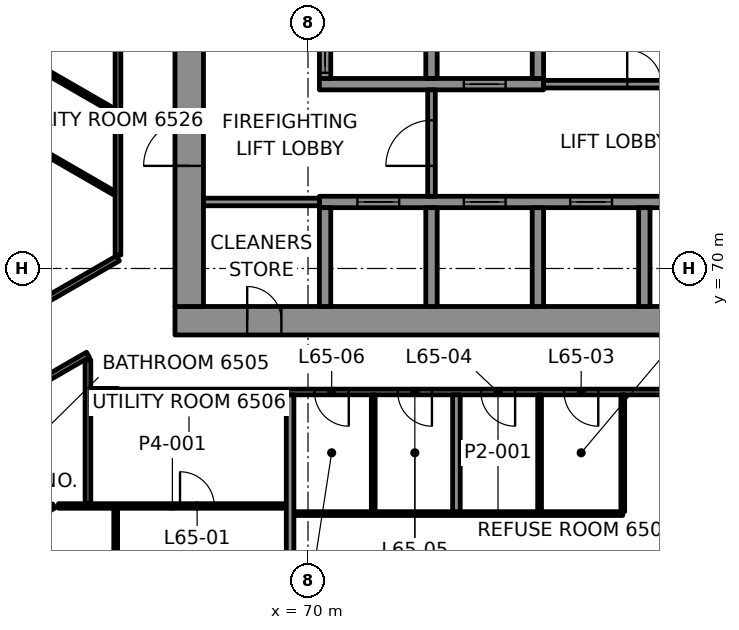
"""IFC4 building model, lengths in metres.
Left out: names, types, materials, properties, quantities, classifications, styles, units other than length and angle.
Written with IfcOpenShell. Run it as: python <this file> out.ifc"""

import sys

from ifc_helpers import new_model, si_unit, direction, frame, frame_2d, origin, place, context, subcontext, project, spatial, rectangle, extrude, element, fill, save


model = new_model("IFC4")
c1 = context("Model", 3, precision=1e-05, world=origin(), true_north=direction((0.0, 1.0)))
c2 = subcontext(c1, "Body", "Model", "MODEL_VIEW")
j1 = project(units=[si_unit("LENGTHUNIT", "METRE"), si_unit("PLANEANGLEUNIT", "RADIAN")], contexts=[c1])
p1 = place(None, origin())
s1 = spatial("IfcSite", under=j1, at=p1, CompositionType="ELEMENT")
p2 = place(p1, origin())
s2 = spatial("IfcBuilding", under=s1, at=p2, CompositionType="ELEMENT")
p3 = place(p2, frame((0.0, 0.0, 274.1)))
s3 = spatial("IfcBuildingStorey", under=s2, at=p3, CompositionType="ELEMENT", Elevation=274.1)
p4 = place(p3, frame((66.5, 68.625, 0.0), z_axis=(0.0, 0.0, 1.0), x_axis=(1.0, 0.0, 0.0)))
e1 = element("IfcWall", 1, at=p4, inside=s3, PredefinedType="SHEAR", context=c2, shape_type="SweptSolid", body=[
    extrude(rectangle(XDim=17.0, YDim=0.75, at=frame_2d((8.5, 0.0))), origin(), (0.0, 0.0, 1.0), 3.3),
])
p5 = place(p4, frame((1.9, 0.0, 0.0)))
e2 = element("IfcOpeningElement", 2, at=p5, cuts=e1, PredefinedType="OPENING", context=c2, shape_type="SweptSolid", body=[
    extrude(rectangle(XDim=0.9, YDim=2.1, at=frame_2d((0.45, 1.05))), frame((0.0, 0.385, 0.0), z_axis=(0.0, -1.0, 0.0), x_axis=(1.0, 0.0, 0.0)), (0.0, 0.0, 1.0), 0.77),
])
p6 = place(p3, frame((66.875, 69.0, 0.0), z_axis=(0.0, 0.0, 1.0), x_axis=(0.0, 1.0, 0.0)))
e3 = element("IfcWall", 3, at=p6, inside=s3, PredefinedType="SHEAR", context=c2, shape_type="SweptSolid", body=[
    extrude(rectangle(XDim=12.0, YDim=0.75, at=frame_2d((6.0, 0.0))), origin(), (0.0, 0.0, 1.0), 3.3),
])
p7 = place(p6, frame((3.7, 0.0, 0.0)))
e4 = element("IfcOpeningElement", 4, at=p7, cuts=e3, PredefinedType="OPENING", context=c2, shape_type="SweptSolid", body=[
    extrude(rectangle(XDim=1.2, YDim=2.1, at=frame_2d((0.6, 1.05))), frame((0.0, 0.385, 0.0), z_axis=(0.0, -1.0, 0.0), x_axis=(1.0, 0.0, 0.0)), (0.0, 0.0, 1.0), 0.77),
])
p8 = place(p3, frame((70.3, 71.75, 0.0), z_axis=(0.0, 0.0, 1.0), x_axis=(1.0, 0.0, 0.0)))
e5 = element("IfcWall", 5, at=p8, inside=s3, PredefinedType="SHEAR", context=c2, shape_type="SweptSolid", body=[
    extrude(rectangle(XDim=11.5, YDim=0.3, at=frame_2d((5.75, 0.0))), origin(), (0.0, 0.0, 1.0), 3.3),
])
p9 = place(p8, frame((1.0, 0.0, 0.0)))
e6 = element("IfcOpeningElement", 6, at=p9, cuts=e5, PredefinedType="OPENING", context=c2, shape_type="SweptSolid", body=[
    extrude(rectangle(XDim=1.1, YDim=2.1, at=frame_2d((0.55, 1.05))), frame((0.0, 0.16, 0.0), z_axis=(0.0, -1.0, 0.0), x_axis=(1.0, 0.0, 0.0)), (0.0, 0.0, 1.0), 0.32),
])
p10 = place(p8, frame((3.8, 0.0, 0.0)))
e7 = element("IfcOpeningElement", 7, at=p10, cuts=e5, PredefinedType="OPENING", context=c2, shape_type="SweptSolid", body=[
    extrude(rectangle(XDim=1.1, YDim=2.1, at=frame_2d((0.55, 1.05))), frame((0.0, 0.16, 0.0), z_axis=(0.0, -1.0, 0.0), x_axis=(1.0, 0.0, 0.0)), (0.0, 0.0, 1.0), 0.32),
])
p11 = place(p8, frame((6.6, 0.0, 0.0)))
e8 = element("IfcOpeningElement", 8, at=p11, cuts=e5, PredefinedType="OPENING", context=c2, shape_type="SweptSolid", body=[
    extrude(rectangle(XDim=1.1, YDim=2.1, at=frame_2d((0.55, 1.05))), frame((0.0, 0.16, 0.0), z_axis=(0.0, -1.0, 0.0), x_axis=(1.0, 0.0, 0.0)), (0.0, 0.0, 1.0), 0.32),
])
p12 = place(p8, frame((9.4, 0.0, 0.0)))
e9 = element("IfcOpeningElement", 9, at=p12, cuts=e5, PredefinedType="OPENING", context=c2, shape_type="SweptSolid", body=[
    extrude(rectangle(XDim=1.1, YDim=2.1, at=frame_2d((0.55, 1.05))), frame((0.0, 0.16, 0.0), z_axis=(0.0, -1.0, 0.0), x_axis=(1.0, 0.0, 0.0)), (0.0, 0.0, 1.0), 0.32),
])
p13 = place(p3, frame((70.3, 74.85, 0.0), z_axis=(0.0, 0.0, 1.0), x_axis=(1.0, 0.0, 0.0)))
e10 = element("IfcWall", 10, at=p13, inside=s3, PredefinedType="SHEAR", context=c2, shape_type="SweptSolid", body=[
    extrude(rectangle(XDim=5.9, YDim=0.3, at=frame_2d((2.95, 0.0))), origin(), (0.0, 0.0, 1.0), 3.3),
])
p14 = place(p13, frame((3.8, 0.0, 0.0)))
e11 = element("IfcOpeningElement", 11, at=p14, cuts=e10, PredefinedType="OPENING", context=c2, shape_type="SweptSolid", body=[
    extrude(rectangle(XDim=1.1, YDim=2.1, at=frame_2d((0.55, 1.05))), frame((0.0, 0.16, 0.0), z_axis=(0.0, -1.0, 0.0), x_axis=(1.0, 0.0, 0.0)), (0.0, 0.0, 1.0), 0.32),
])
p15 = place(p3, frame((70.45, 69.0, 0.0), z_axis=(0.0, 0.0, 1.0), x_axis=(0.0, 1.0, 0.0)))
e12 = element("IfcWall", 12, at=p15, inside=s3, PredefinedType="SHEAR", context=c2, shape_type="SweptSolid", body=[
    extrude(rectangle(XDim=2.6, YDim=0.3, at=frame_2d((1.3, 0.0))), origin(), (0.0, 0.0, 1.0), 3.3),
])
p16 = place(p3, frame((70.45, 75.0, 0.0), z_axis=(0.0, 0.0, 1.0), x_axis=(0.0, 1.0, 0.0)))
e13 = element("IfcWall", 13, at=p16, inside=s3, PredefinedType="SHEAR", context=c2, shape_type="SweptSolid", body=[
    extrude(rectangle(XDim=2.6, YDim=0.3, at=frame_2d((1.3, 0.0))), origin(), (0.0, 0.0, 1.0), 3.3),
])
p17 = place(p16, frame((0.15, 0.0, 0.0)))
e14 = element("IfcOpeningElement", 14, at=p17, cuts=e13, PredefinedType="OPENING", context=c2, shape_type="SweptSolid", body=[
    extrude(rectangle(XDim=1.1, YDim=2.1, at=frame_2d((0.55, 1.05))), frame((0.0, 0.16, 0.0), z_axis=(0.0, -1.0, 0.0), x_axis=(1.0, 0.0, 0.0)), (0.0, 0.0, 1.0), 0.32),
])
for number, where, z_axis, x_axis in (
    (15, (73.25, 69.0, 0.0), (0.0, 0.0, 1.0), (0.0, 1.0, 0.0)),
    (16, (73.25, 75.0, 0.0), (0.0, 0.0, 1.0), (0.0, 1.0, 0.0)),
    (17, (76.05, 69.0, 0.0), (0.0, 0.0, 1.0), (0.0, 1.0, 0.0)),
    (18, (76.05, 75.0, 0.0), (0.0, 0.0, 1.0), (0.0, 1.0, 0.0)),
    (19, (78.85, 69.0, 0.0), (0.0, 0.0, 1.0), (0.0, 1.0, 0.0)),
):
    element("IfcWall", number, at=place(p3, frame(where, z_axis=z_axis, x_axis=x_axis)), inside=s3, PredefinedType="SHEAR", context=c2, shape_type="SweptSolid", body=[
        extrude(rectangle(XDim=2.6, YDim=0.3, at=frame_2d((1.3, 0.0))), origin(), (0.0, 0.0, 1.0), 3.3),
    ])
p18 = place(p3, frame((69.629, 63.55, 0.0), z_axis=(0.0, 0.0, 1.0), x_axis=(1.0, 0.0, 0.0)))
e20 = element("IfcWall", 20, at=p18, inside=s3, PredefinedType="PARTITIONING", context=c2, shape_type="SweptSolid", body=[
    extrude(rectangle(XDim=8.653, YDim=0.1, at=frame_2d((4.326, 0.0))), origin(), (0.0, 0.0, 1.0), 2.7),
])
p19 = place(p3, frame((63.434, 63.75, 0.0), z_axis=(0.0, 0.0, 1.0), x_axis=(1.0, 0.0, 0.0)))
e21 = element("IfcWall", 21, at=p19, inside=s3, PredefinedType="PARTITIONING", context=c2, shape_type="SweptSolid", body=[
    extrude(rectangle(XDim=5.995, YDim=0.12, at=frame_2d((2.997, 0.0))), origin(), (0.0, 0.0, 1.0), 2.7),
])
p20 = place(p19, frame((3.199, 0.0, 0.0)))
e22 = element("IfcOpeningElement", 22, at=p20, cuts=e21, PredefinedType="OPENING", context=c2, shape_type="SweptSolid", body=[
    extrude(rectangle(XDim=0.9, YDim=2.1, at=frame_2d((0.45, 1.05))), frame((0.0, 0.07, 0.0), z_axis=(0.0, -1.0, 0.0), x_axis=(1.0, 0.0, 0.0)), (0.0, 0.0, 1.0), 0.14),
])
p21 = place(p3, frame((85.0, 66.75, 0.0), z_axis=(0.0, 0.0, 1.0), x_axis=(-1.0, 0.0, 0.0)))
e23 = element("IfcWall", 23, at=p21, inside=s3, PredefinedType="PARTITIONING", context=c2, shape_type="SweptSolid", body=[
    extrude(rectangle(XDim=19.999, YDim=0.15, at=frame_2d((10.0, 0.0))), origin(), (0.0, 0.0, 1.0), 2.7),
])
p22 = place(p21, frame((2.96, 0.0, 0.0)))
e24 = element("IfcOpeningElement", 24, at=p22, cuts=e23, PredefinedType="OPENING", context=c2, shape_type="SweptSolid", body=[
    extrude(rectangle(XDim=1.0, YDim=2.1, at=frame_2d((0.5, 1.05))), frame((0.0, 0.085, 0.0), z_axis=(0.0, -1.0, 0.0), x_axis=(1.0, 0.0, 0.0)), (0.0, 0.0, 1.0), 0.17),
])
p23 = place(p21, frame((7.361, 0.0, 0.0)))
e25 = element("IfcOpeningElement", 25, at=p23, cuts=e23, PredefinedType="OPENING", context=c2, shape_type="SweptSolid", body=[
    extrude(rectangle(XDim=0.9, YDim=2.1, at=frame_2d((0.45, 1.05))), frame((0.0, 0.085, 0.0), z_axis=(0.0, -1.0, 0.0), x_axis=(1.0, 0.0, 0.0)), (0.0, 0.0, 1.0), 0.17),
])
p24 = place(p21, frame((9.55, 0.0, 0.0)))
e26 = element("IfcOpeningElement", 26, at=p24, cuts=e23, PredefinedType="OPENING", context=c2, shape_type="SweptSolid", body=[
    extrude(rectangle(XDim=0.9, YDim=2.1, at=frame_2d((0.45, 1.05))), frame((0.0, 0.085, 0.0), z_axis=(0.0, -1.0, 0.0), x_axis=(1.0, 0.0, 0.0)), (0.0, 0.0, 1.0), 0.17),
])
p25 = place(p21, frame((11.738, 0.0, 0.0)))
e27 = element("IfcOpeningElement", 27, at=p25, cuts=e23, PredefinedType="OPENING", context=c2, shape_type="SweptSolid", body=[
    extrude(rectangle(XDim=0.9, YDim=2.1, at=frame_2d((0.45, 1.05))), frame((0.0, 0.085, 0.0), z_axis=(0.0, -1.0, 0.0), x_axis=(1.0, 0.0, 0.0)), (0.0, 0.0, 1.0), 0.17),
])
p26 = place(p21, frame((13.926, 0.0, 0.0)))
e28 = element("IfcOpeningElement", 28, at=p26, cuts=e23, PredefinedType="OPENING", context=c2, shape_type="SweptSolid", body=[
    extrude(rectangle(XDim=0.9, YDim=2.1, at=frame_2d((0.45, 1.05))), frame((0.0, 0.085, 0.0), z_axis=(0.0, -1.0, 0.0), x_axis=(1.0, 0.0, 0.0)), (0.0, 0.0, 1.0), 0.17),
])
p27 = place(p3, frame((64.295, 66.769, 0.0), z_axis=(0.0, 0.0, 1.0), x_axis=(1.0, 0.0, 0.0)))
e29 = element("IfcWall", 29, at=p27, inside=s3, PredefinedType="PARTITIONING", context=c2, shape_type="SweptSolid", body=[
    extrude(rectangle(XDim=0.705, YDim=0.15, at=frame_2d((0.353, 0.0))), origin(), (0.0, 0.0, 1.0), 2.7),
])
p28 = place(p3, frame((52.517, 57.516, 0.0), z_axis=(0.0, 0.0, 1.0), x_axis=(0.866028080334, 0.499995364051, 0.0)))
e30 = element("IfcWall", 30, at=p28, inside=s3, PredefinedType="PARTITIONING", context=c2, shape_type="SweptSolid", body=[
    extrude(rectangle(XDim=12.467, YDim=0.12, at=frame_2d((6.234, 0.0))), origin(), (0.0, 0.0, 1.0), 2.7),
])
p29 = place(p28, frame((3.019, 0.0, 0.0)))
e31 = element("IfcOpeningElement", 31, at=p29, cuts=e30, PredefinedType="OPENING", context=c2, shape_type="SweptSolid", body=[
    extrude(rectangle(XDim=0.9, YDim=2.1, at=frame_2d((0.45, 1.05))), frame((0.0, 0.07, 0.0), z_axis=(0.0, -1.0, 0.0), x_axis=(1.0, 0.0, 0.0)), (0.0, 0.0, 1.0), 0.14),
])
p30 = place(p28, frame((10.057, 0.0, 0.0)))
e32 = element("IfcOpeningElement", 32, at=p30, cuts=e30, PredefinedType="OPENING", context=c2, shape_type="SweptSolid", body=[
    extrude(rectangle(XDim=0.8, YDim=2.1, at=frame_2d((0.4, 1.05))), frame((0.0, 0.07, 0.0), z_axis=(0.0, -1.0, 0.0), x_axis=(1.0, 0.0, 0.0)), (0.0, 0.0, 1.0), 0.14),
])
p31 = place(p3, frame((64.21, 67.731, 0.0), z_axis=(0.0, 0.0, 1.0), x_axis=(-0.866027247007, -0.499996807431, 0.0)))
e33 = element("IfcWall", 33, at=p31, inside=s3, PredefinedType="PARTITIONING", context=c2, shape_type="SweptSolid", body=[
    extrude(rectangle(XDim=12.633, YDim=0.15, at=frame_2d((6.316, 0.0))), origin(), (0.0, 0.0, 1.0), 2.547),
])
p32 = place(p31, frame((8.143, 0.0, 0.0)))
e34 = element("IfcOpeningElement", 34, at=p32, cuts=e33, PredefinedType="OPENING", context=c2, shape_type="SweptSolid", body=[
    extrude(rectangle(XDim=1.0, YDim=2.1, at=frame_2d((0.5, 1.05))), frame((0.0, 0.085, 0.0), z_axis=(0.0, -1.0, 0.0), x_axis=(1.0, 0.0, 0.0)), (0.0, 0.0, 1.0), 0.17),
])
p33 = place(p3, frame((52.37, 62.974, 0.0), z_axis=(0.0, 0.0, 1.0), x_axis=(0.866025849409, 0.499999228155, 0.0)))
e35 = element("IfcWall", 35, at=p33, inside=s3, PredefinedType="PARTITIONING", context=c2, shape_type="SweptSolid", body=[
    extrude(rectangle(XDim=14.584, YDim=0.15, at=frame_2d((7.292, 0.0))), origin(), (0.0, 0.0, 1.0), 2.7),
])
p34 = place(p33, frame((2.858, 0.0, 0.0)))
e36 = element("IfcOpeningElement", 36, at=p34, cuts=e35, PredefinedType="OPENING", context=c2, shape_type="SweptSolid", body=[
    extrude(rectangle(XDim=1.0, YDim=2.1, at=frame_2d((0.5, 1.05))), frame((0.0, 0.085, 0.0), z_axis=(0.0, -1.0, 0.0), x_axis=(1.0, 0.0, 0.0)), (0.0, 0.0, 1.0), 0.17),
])
p35 = place(p33, frame((9.947, 0.0, 0.0)))
e37 = element("IfcOpeningElement", 37, at=p35, cuts=e35, PredefinedType="OPENING", context=c2, shape_type="SweptSolid", body=[
    extrude(rectangle(XDim=1.0, YDim=2.1, at=frame_2d((0.5, 1.05))), frame((0.0, 0.085, 0.0), z_axis=(0.0, -1.0, 0.0), x_axis=(1.0, 0.0, 0.0)), (0.0, 0.0, 1.0), 0.17),
])
p36 = place(p3, frame((78.283, 63.601, 0.0), z_axis=(0.0, 0.0, 1.0), x_axis=(0.0, 1.0, 0.0)))
e38 = element("IfcWall", 38, at=p36, inside=s3, PredefinedType="PARTITIONING", context=c2, shape_type="SweptSolid", body=[
    extrude(rectangle(XDim=3.074, YDim=0.1, at=frame_2d((1.537, 0.0))), origin(), (0.0, 0.0, 1.0), 2.7),
])
p37 = place(p3, frame((76.094, 63.6, 0.0), z_axis=(0.0, 0.0, 1.0), x_axis=(0.0, 1.0, 0.0)))
e39 = element("IfcWall", 39, at=p37, inside=s3, PredefinedType="PARTITIONING", context=c2, shape_type="SweptSolid", body=[
    extrude(rectangle(XDim=3.075, YDim=0.1, at=frame_2d((1.538, 0.0))), origin(), (0.0, 0.0, 1.0), 2.7),
])
p38 = place(p3, frame((73.906, 63.6, 0.0), z_axis=(0.0, 0.0, 1.0), x_axis=(0.0, 1.0, 0.0)))
e40 = element("IfcWall", 40, at=p38, inside=s3, PredefinedType="PARTITIONING", context=c2, shape_type="SweptSolid", body=[
    extrude(rectangle(XDim=3.075, YDim=0.2, at=frame_2d((1.538, 0.0))), origin(), (0.0, 0.0, 1.0), 2.7),
])
p39 = place(p3, frame((71.717, 63.6, 0.0), z_axis=(0.0, 0.0, 1.0), x_axis=(0.0, 1.0, 0.0)))
e41 = element("IfcWall", 41, at=p39, inside=s3, PredefinedType="PARTITIONING", context=c2, shape_type="SweptSolid", body=[
    extrude(rectangle(XDim=3.075, YDim=0.1, at=frame_2d((1.538, 0.0))), origin(), (0.0, 0.0, 1.0), 2.7),
])
p40 = place(p3, frame((69.529, 57.516, 0.0), z_axis=(0.0, 0.0, 1.0), x_axis=(0.0, 1.0, 0.0)))
e42 = element("IfcWall", 42, at=p40, inside=s3, PredefinedType="PARTITIONING", context=c2, shape_type="SweptSolid", body=[
    extrude(rectangle(XDim=9.159, YDim=0.2, at=frame_2d((4.579, 0.0))), origin(), (0.0, 0.0, 1.0), 2.688),
])
p41 = place(p3, frame((65.0, 70.352, 0.0), z_axis=(0.0, 0.0, 1.0), x_axis=(0.0, 1.0, 0.0)))
e43 = element("IfcWall", 43, at=p41, inside=s3, PredefinedType="PARTITIONING", context=c2, shape_type="SweptSolid", body=[
    extrude(rectangle(XDim=12.898, YDim=0.15, at=frame_2d((6.449, 0.0))), origin(), (0.0, 0.0, 1.0), 2.7),
])
p42 = place(p3, frame((64.94, 63.69, 0.0), z_axis=(0.0, 0.0, 1.0), x_axis=(0.0, -1.0, 0.0)))
e44 = element("IfcWall", 44, at=p42, inside=s3, PredefinedType="PARTITIONING", context=c2, shape_type="SweptSolid", body=[
    extrude(rectangle(XDim=4.614, YDim=0.1, at=frame_2d((2.307, 0.0))), origin(), (0.0, 0.0, 1.0), 2.7),
])
p43 = place(p42, frame((1.857, 0.0, 0.0)))
e45 = element("IfcOpeningElement", 45, at=p43, cuts=e44, PredefinedType="OPENING", context=c2, shape_type="SweptSolid", body=[
    extrude(rectangle(XDim=0.9, YDim=2.1, at=frame_2d((0.45, 1.05))), frame((0.0, 0.06, 0.0), z_axis=(0.0, -1.0, 0.0), x_axis=(1.0, 0.0, 0.0)), (0.0, 0.0, 1.0), 0.12),
])
p44 = place(p3, frame((64.21, 63.81, 0.0), z_axis=(0.0, 0.0, 1.0), x_axis=(0.0, 1.0, 0.0)))
e46 = element("IfcWall", 46, at=p44, inside=s3, PredefinedType="PARTITIONING", context=c2, shape_type="SweptSolid", body=[
    extrude(rectangle(XDim=3.784, YDim=0.15, at=frame_2d((1.892, 0.0))), origin(), (0.0, 0.0, 1.0), 2.547),
])
p45 = place(p3, frame((64.891, 74.149, 0.0), z_axis=(0.0, 0.0, 1.0), x_axis=(-0.866019355129, 0.500010476433, 0.0)))
e47 = element("IfcWall", 47, at=p45, inside=s3, PredefinedType="PARTITIONING", context=c2, shape_type="SweptSolid", body=[
    extrude(rectangle(XDim=3.229, YDim=0.12, at=frame_2d((1.614, 0.0))), origin(), (0.0, 0.0, 1.0), 2.7),
])
p46 = place(p3, frame((64.899, 71.987, 0.0), z_axis=(0.0, 0.0, 1.0), x_axis=(-0.866032610133, 0.499987518031, 0.0)))
e48 = element("IfcWall", 48, at=p46, inside=s3, PredefinedType="PARTITIONING", context=c2, shape_type="SweptSolid", body=[
    extrude(rectangle(XDim=3.295, YDim=0.1, at=frame_2d((1.648, 0.0))), origin(), (0.0, 0.0, 1.0), 2.7),
])
p47 = place(p3, frame((67.25, 71.75, 0.0), z_axis=(0.0, 0.0, 1.0), x_axis=(1.0, 0.0, 0.0)))
e49 = element("IfcWall", 49, at=p47, inside=s3, PredefinedType="PARTITIONING", context=c2, shape_type="SweptSolid", body=[
    extrude(rectangle(XDim=3.05, YDim=0.2, at=frame_2d((1.525, 0.0))), origin(), (0.0, 0.0, 1.0), 3.3),
])
p48 = place(p3, frame((76.2, 74.85, 0.0), z_axis=(0.0, 0.0, 1.0), x_axis=(1.0, 0.0, 0.0)))
e50 = element("IfcWall", 50, at=p48, inside=s3, PredefinedType="PARTITIONING", context=c2, shape_type="SweptSolid", body=[
    extrude(rectangle(XDim=6.55, YDim=0.2, at=frame_2d((3.275, 0.0))), origin(), (0.0, 0.0, 1.0), 3.3),
])
p49 = place(p48, frame((2.2, 0.0, 0.0)))
e51 = element("IfcOpeningElement", 51, at=p49, cuts=e50, PredefinedType="OPENING", context=c2, shape_type="SweptSolid", body=[
    extrude(rectangle(XDim=0.9, YDim=2.1, at=frame_2d((0.45, 1.05))), frame((0.0, 0.11, 0.0), z_axis=(0.0, -1.0, 0.0), x_axis=(1.0, 0.0, 0.0)), (0.0, 0.0, 1.0), 0.22),
])
p50 = place(p3, frame((73.25, 71.9, 0.0), z_axis=(0.0, 0.0, 1.0), x_axis=(0.0, 1.0, 0.0)))
e52 = element("IfcWall", 52, at=p50, inside=s3, PredefinedType="PARTITIONING", context=c2, shape_type="SweptSolid", body=[
    extrude(rectangle(XDim=2.8, YDim=0.2, at=frame_2d((1.4, 0.0))), origin(), (0.0, 0.0, 1.0), 3.3),
])
p51 = place(p50, frame((0.8, 0.0, 0.0)))
e53 = element("IfcOpeningElement", 53, at=p51, cuts=e52, PredefinedType="OPENING", context=c2, shape_type="SweptSolid", body=[
    extrude(rectangle(XDim=1.2, YDim=2.1, at=frame_2d((0.6, 1.05))), frame((0.0, 0.11, 0.0), z_axis=(0.0, -1.0, 0.0), x_axis=(1.0, 0.0, 0.0)), (0.0, 0.0, 1.0), 0.22),
])
p52 = place(p20, origin())
e54 = element("IfcDoor", 54, at=p52, inside=s3, OperationType="SINGLE_SWING_LEFT", PredefinedType="DOOR", context=c2, shape_type="SweptSolid", body=[
    extrude(rectangle(XDim=0.9, YDim=2.1, at=frame_2d((0.45, 1.05))), frame((0.0, 0.025, 0.0), z_axis=(0.0, -1.0, 0.0), x_axis=(1.0, 0.0, 0.0)), (0.0, 0.0, 1.0), 0.05),
])
fill(e22, e54)
p53 = place(p23, origin())
e55 = element("IfcDoor", 55, at=p53, inside=s3, OperationType="SINGLE_SWING_RIGHT", PredefinedType="DOOR", context=c2, shape_type="SweptSolid", body=[
    extrude(rectangle(XDim=0.9, YDim=2.1, at=frame_2d((0.45, 1.05))), frame((0.0, 0.025, 0.0), z_axis=(0.0, -1.0, 0.0), x_axis=(1.0, 0.0, 0.0)), (0.0, 0.0, 1.0), 0.05),
])
fill(e25, e55)
p54 = place(p24, origin())
e56 = element("IfcDoor", 56, at=p54, inside=s3, OperationType="SINGLE_SWING_LEFT", PredefinedType="DOOR", context=c2, shape_type="SweptSolid", body=[
    extrude(rectangle(XDim=0.9, YDim=2.1, at=frame_2d((0.45, 1.05))), frame((0.0, 0.025, 0.0), z_axis=(0.0, -1.0, 0.0), x_axis=(1.0, 0.0, 0.0)), (0.0, 0.0, 1.0), 0.05),
])
fill(e26, e56)
p55 = place(p25, origin())
e57 = element("IfcDoor", 57, at=p55, inside=s3, OperationType="SINGLE_SWING_RIGHT", PredefinedType="DOOR", context=c2, shape_type="SweptSolid", body=[
    extrude(rectangle(XDim=0.9, YDim=2.1, at=frame_2d((0.45, 1.05))), frame((0.0, 0.025, 0.0), z_axis=(0.0, -1.0, 0.0), x_axis=(1.0, 0.0, 0.0)), (0.0, 0.0, 1.0), 0.05),
])
fill(e27, e57)
p56 = place(p26, origin())
e58 = element("IfcDoor", 58, at=p56, inside=s3, OperationType="SINGLE_SWING_LEFT", PredefinedType="DOOR", context=c2, shape_type="SweptSolid", body=[
    extrude(rectangle(XDim=0.9, YDim=2.1, at=frame_2d((0.45, 1.05))), frame((0.0, 0.025, 0.0), z_axis=(0.0, -1.0, 0.0), x_axis=(1.0, 0.0, 0.0)), (0.0, 0.0, 1.0), 0.05),
])
fill(e28, e58)
p57 = place(p9, origin())
e59 = element("IfcDoor", 59, at=p57, inside=s3, OperationType="DOUBLE_DOOR_SLIDING", PredefinedType="DOOR", context=c2, shape_type="SweptSolid", body=[
    extrude(rectangle(XDim=1.1, YDim=2.1, at=frame_2d((0.55, 1.05))), frame((0.0, 0.025, 0.0), z_axis=(0.0, -1.0, 0.0), x_axis=(1.0, 0.0, 0.0)), (0.0, 0.0, 1.0), 0.05),
])
fill(e6, e59)
p58 = place(p10, origin())
e60 = element("IfcDoor", 60, at=p58, inside=s3, OperationType="DOUBLE_DOOR_SLIDING", PredefinedType="DOOR", context=c2, shape_type="SweptSolid", body=[
    extrude(rectangle(XDim=1.1, YDim=2.1, at=frame_2d((0.55, 1.05))), frame((0.0, 0.025, 0.0), z_axis=(0.0, -1.0, 0.0), x_axis=(1.0, 0.0, 0.0)), (0.0, 0.0, 1.0), 0.05),
])
fill(e7, e60)
p59 = place(p11, origin())
e61 = element("IfcDoor", 61, at=p59, inside=s3, OperationType="DOUBLE_DOOR_SLIDING", PredefinedType="DOOR", context=c2, shape_type="SweptSolid", body=[
    extrude(rectangle(XDim=1.1, YDim=2.1, at=frame_2d((0.55, 1.05))), frame((0.0, 0.025, 0.0), z_axis=(0.0, -1.0, 0.0), x_axis=(1.0, 0.0, 0.0)), (0.0, 0.0, 1.0), 0.05),
])
fill(e8, e61)
p60 = place(p17, origin())
e62 = element("IfcDoor", 62, at=p60, inside=s3, OperationType="DOUBLE_DOOR_SLIDING", PredefinedType="DOOR", context=c2, shape_type="SweptSolid", body=[
    extrude(rectangle(XDim=1.1, YDim=2.1, at=frame_2d((0.55, 1.05))), frame((0.0, 0.025, 0.0), z_axis=(0.0, -1.0, 0.0), x_axis=(1.0, 0.0, 0.0)), (0.0, 0.0, 1.0), 0.05),
])
fill(e14, e62)
p61 = place(p14, origin())
e63 = element("IfcDoor", 63, at=p61, inside=s3, OperationType="DOUBLE_DOOR_SLIDING", PredefinedType="DOOR", context=c2, shape_type="SweptSolid", body=[
    extrude(rectangle(XDim=1.1, YDim=2.1, at=frame_2d((0.55, 1.05))), frame((0.0, 0.025, 0.0), z_axis=(0.0, -1.0, 0.0), x_axis=(1.0, 0.0, 0.0)), (0.0, 0.0, 1.0), 0.05),
])
fill(e11, e63)
p62 = place(p51, origin())
e64 = element("IfcDoor", 64, at=p62, inside=s3, OperationType="SINGLE_SWING_LEFT", PredefinedType="DOOR", context=c2, shape_type="SweptSolid", body=[
    extrude(rectangle(XDim=1.2, YDim=2.1, at=frame_2d((0.6, 1.05))), frame((0.0, 0.025, 0.0), z_axis=(0.0, -1.0, 0.0), x_axis=(1.0, 0.0, 0.0)), (0.0, 0.0, 1.0), 0.05),
])
fill(e53, e64)
p63 = place(p7, origin())
e65 = element("IfcDoor", 65, at=p63, inside=s3, OperationType="SINGLE_SWING_RIGHT", PredefinedType="DOOR", context=c2, shape_type="SweptSolid", body=[
    extrude(rectangle(XDim=1.2, YDim=2.1, at=frame_2d((0.6, 1.05))), frame((0.0, 0.095, 0.0), z_axis=(0.0, -1.0, 0.0), x_axis=(1.0, 0.0, 0.0)), (0.0, 0.0, 1.0), 0.19),
])
fill(e4, e65)
p64 = place(p5, origin())
e66 = element("IfcDoor", 66, at=p64, inside=s3, OperationType="SINGLE_SWING_RIGHT", PredefinedType="DOOR", context=c2, shape_type="SweptSolid", body=[
    extrude(rectangle(XDim=0.9, YDim=2.1, at=frame_2d((0.45, 1.05))), frame((0.0, 0.095, 0.0), z_axis=(0.0, -1.0, 0.0), x_axis=(1.0, 0.0, 0.0)), (0.0, 0.0, 1.0), 0.19),
])
fill(e2, e66)
p65 = place(p49, origin())
e67 = element("IfcDoor", 67, at=p65, inside=s3, OperationType="SINGLE_SWING_LEFT", PredefinedType="DOOR", context=c2, shape_type="SweptSolid", body=[
    extrude(rectangle(XDim=0.9, YDim=2.1, at=frame_2d((0.45, 1.05))), frame((0.0, 0.025, 0.0), z_axis=(0.0, -1.0, 0.0), x_axis=(1.0, 0.0, 0.0)), (0.0, 0.0, 1.0), 0.05),
])
fill(e51, e67)
save(model, sys.argv[1])
